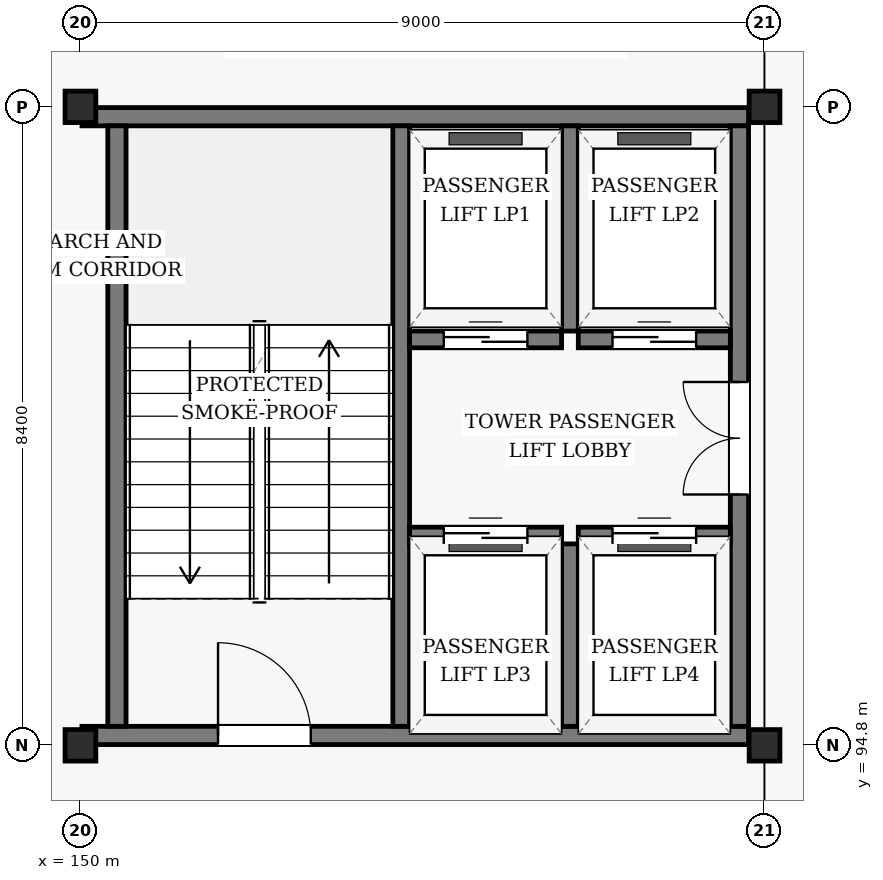
"""IFC4 building model, lengths in metres.
Left out: names, types, materials, properties, quantities, classifications, styles, units other than length and angle.
Written with IfcOpenShell. Run it as: python <this file> out.ifc"""

import sys

from ifc_helpers import new_model, si_unit, direction, frame, frame_2d, origin, origin_2d, place, context, subcontext, project, spatial, rectangle, i_section, extrude, element, fill, save


model = new_model("IFC4")
c1 = context("Model", 3, precision=1e-05, world=origin(), true_north=direction((0.0, 1.0)))
c2 = subcontext(c1, "Body", "Model", "MODEL_VIEW")
j1 = project(units=[si_unit("LENGTHUNIT", "METRE"), si_unit("PLANEANGLEUNIT", "RADIAN")], contexts=[c1])
p1 = place(None, origin())
s1 = spatial("IfcSite", under=j1, at=p1, CompositionType="ELEMENT")
p2 = place(p1, origin())
s2 = spatial("IfcBuilding", under=s1, at=p2, CompositionType="ELEMENT")
p3 = place(p2, frame((0.0, 0.0, 13.2)))
s3 = spatial("IfcBuildingStorey", under=s2, at=p3, CompositionType="ELEMENT", Elevation=13.2)
for number, where, z_axis, x_axis in (
    (1, (150.0, 94.8, 0.0), (0.0, 0.0, 1.0), (1.0, 0.0, 0.0)),
    (2, (150.0, 103.2, 0.0), (0.0, 0.0, 1.0), (1.0, 0.0, 0.0)),
    (3, (159.0, 94.8, 0.0), (0.0, 0.0, 1.0), (1.0, 0.0, 0.0)),
    (4, (159.0, 103.2, 0.0), (0.0, 0.0, 1.0), (1.0, 0.0, 0.0)),
):
    element("IfcColumn", number, at=place(p3, frame(where, z_axis=z_axis, x_axis=x_axis)), inside=s3, PredefinedType="COLUMN", context=c2, shape_type="SweptSolid", body=[
        extrude(i_section(OverallWidth=0.405, OverallDepth=0.414, WebThickness=0.018, FlangeThickness=0.028, FilletRadius=0.022, at=origin_2d()), origin(), (0.0, 0.0, 1.0), 3.9),
    ])
p4 = place(p3, frame((150.02, 94.93, 0.0), z_axis=(0.0, 0.0, 1.0), x_axis=(1.0, 0.0, 0.0)))
e5 = element("IfcWall", 5, at=p4, inside=s3, PredefinedType="SHEAR", context=c2, shape_type="SweptSolid", body=[
    extrude(rectangle(XDim=8.77, YDim=0.24, at=frame_2d((4.385, 0.0))), origin(), (0.0, 0.0, 1.0), 3.62),
])
p5 = place(p4, frame((1.79, 0.0, 0.0)))
e6 = element("IfcOpeningElement", 6, at=p5, cuts=e5, PredefinedType="OPENING", context=c2, shape_type="SweptSolid", body=[
    extrude(rectangle(XDim=1.22, YDim=2.18, at=frame_2d((0.61, 1.09))), frame((0.0, 0.13, 0.0), z_axis=(0.0, -1.0, 0.0), x_axis=(1.0, 0.0, 0.0)), (0.0, 0.0, 1.0), 0.26),
])
p6 = place(p3, frame((150.02, 103.07, 0.0), z_axis=(0.0, 0.0, 1.0), x_axis=(1.0, 0.0, 0.0)))
e7 = element("IfcWall", 7, at=p6, inside=s3, PredefinedType="SHEAR", context=c2, shape_type="SweptSolid", body=[
    extrude(rectangle(XDim=8.77, YDim=0.24, at=frame_2d((4.385, 0.0))), origin(), (0.0, 0.0, 1.0), 3.62),
])
p7 = place(p3, frame((150.48, 95.05, 0.0), z_axis=(0.0, 0.0, 1.0), x_axis=(0.0, 1.0, 0.0)))
e8 = element("IfcWall", 8, at=p7, inside=s3, PredefinedType="SHEAR", context=c2, shape_type="SweptSolid", body=[
    extrude(rectangle(XDim=7.9, YDim=0.24, at=frame_2d((3.95, 0.0))), origin(), (0.0, 0.0, 1.0), 3.62),
])
p8 = place(p3, frame((154.22, 95.05, 0.0), z_axis=(0.0, 0.0, 1.0), x_axis=(0.0, 1.0, 0.0)))
e9 = element("IfcWall", 9, at=p8, inside=s3, PredefinedType="SHEAR", context=c2, shape_type="SweptSolid", body=[
    extrude(rectangle(XDim=7.9, YDim=0.22, at=frame_2d((3.95, 0.0))), origin(), (0.0, 0.0, 1.0), 3.62),
])
p9 = place(p3, frame((158.67, 95.05, 0.0), z_axis=(0.0, 0.0, 1.0), x_axis=(0.0, 1.0, 0.0)))
e10 = element("IfcWall", 10, at=p9, inside=s3, PredefinedType="SHEAR", context=c2, shape_type="SweptSolid", body=[
    extrude(rectangle(XDim=7.9, YDim=0.24, at=frame_2d((3.95, 0.0))), origin(), (0.0, 0.0, 1.0), 3.62),
])
p10 = place(p9, frame((3.05, 0.0, 0.0)))
e11 = element("IfcOpeningElement", 11, at=p10, cuts=e10, PredefinedType="OPENING", context=c2, shape_type="SweptSolid", body=[
    extrude(rectangle(XDim=1.48, YDim=2.22, at=frame_2d((0.74, 1.11))), frame((0.0, 0.13, 0.0), z_axis=(0.0, -1.0, 0.0), x_axis=(1.0, 0.0, 0.0)), (0.0, 0.0, 1.0), 0.26),
])
p11 = place(p3, frame((156.44, 100.25, 0.0), z_axis=(0.0, 0.0, 1.0), x_axis=(0.0, 1.0, 0.0)))
e12 = element("IfcWall", 12, at=p11, inside=s3, PredefinedType="SHEAR", context=c2, shape_type="SweptSolid", body=[
    extrude(rectangle(XDim=2.7, YDim=0.22, at=frame_2d((1.35, 0.0))), origin(), (0.0, 0.0, 1.0), 3.62),
])
p12 = place(p3, frame((154.33, 100.14, 0.0), z_axis=(0.0, 0.0, 1.0), x_axis=(1.0, 0.0, 0.0)))
e13 = element("IfcWall", 13, at=p12, inside=s3, PredefinedType="SHEAR", context=c2, shape_type="SweptSolid", body=[
    extrude(rectangle(XDim=2.0, YDim=0.22, at=frame_2d((1.0, 0.0))), origin(), (0.0, 0.0, 1.0), 3.62),
])
p13 = place(p12, frame((0.45, 0.0, 0.0)))
e14 = element("IfcOpeningElement", 14, at=p13, cuts=e13, PredefinedType="OPENING", context=c2, shape_type="SweptSolid", body=[
    extrude(rectangle(XDim=1.1, YDim=2.15, at=frame_2d((0.55, 1.075))), frame((0.0, 0.12, 0.0), z_axis=(0.0, -1.0, 0.0), x_axis=(1.0, 0.0, 0.0)), (0.0, 0.0, 1.0), 0.24),
])
p14 = place(p3, frame((156.55, 100.14, 0.0), z_axis=(0.0, 0.0, 1.0), x_axis=(1.0, 0.0, 0.0)))
e15 = element("IfcWall", 15, at=p14, inside=s3, PredefinedType="SHEAR", context=c2, shape_type="SweptSolid", body=[
    extrude(rectangle(XDim=2.0, YDim=0.22, at=frame_2d((1.0, 0.0))), origin(), (0.0, 0.0, 1.0), 3.62),
])
p15 = place(p14, frame((0.45, 0.0, 0.0)))
e16 = element("IfcOpeningElement", 16, at=p15, cuts=e15, PredefinedType="OPENING", context=c2, shape_type="SweptSolid", body=[
    extrude(rectangle(XDim=1.1, YDim=2.15, at=frame_2d((0.55, 1.075))), frame((0.0, 0.12, 0.0), z_axis=(0.0, -1.0, 0.0), x_axis=(1.0, 0.0, 0.0)), (0.0, 0.0, 1.0), 0.24),
])
p16 = place(p3, frame((156.44, 95.05, 0.0), z_axis=(0.0, 0.0, 1.0), x_axis=(0.0, 1.0, 0.0)))
e17 = element("IfcWall", 17, at=p16, inside=s3, PredefinedType="SHEAR", context=c2, shape_type="SweptSolid", body=[
    extrude(rectangle(XDim=2.4, YDim=0.22, at=frame_2d((1.2, 0.0))), origin(), (0.0, 0.0, 1.0), 3.62),
])
p17 = place(p3, frame((154.33, 97.56, 0.0), z_axis=(0.0, 0.0, 1.0), x_axis=(1.0, 0.0, 0.0)))
e18 = element("IfcWall", 18, at=p17, inside=s3, PredefinedType="SHEAR", context=c2, shape_type="SweptSolid", body=[
    extrude(rectangle(XDim=2.0, YDim=0.22, at=frame_2d((1.0, 0.0))), origin(), (0.0, 0.0, 1.0), 3.62),
])
p18 = place(p17, frame((0.45, 0.0, 0.0)))
e19 = element("IfcOpeningElement", 19, at=p18, cuts=e18, PredefinedType="OPENING", context=c2, shape_type="SweptSolid", body=[
    extrude(rectangle(XDim=1.1, YDim=2.15, at=frame_2d((0.55, 1.075))), frame((0.0, 0.12, 0.0), z_axis=(0.0, -1.0, 0.0), x_axis=(1.0, 0.0, 0.0)), (0.0, 0.0, 1.0), 0.24),
])
p19 = place(p3, frame((156.55, 97.56, 0.0), z_axis=(0.0, 0.0, 1.0), x_axis=(1.0, 0.0, 0.0)))
e20 = element("IfcWall", 20, at=p19, inside=s3, PredefinedType="SHEAR", context=c2, shape_type="SweptSolid", body=[
    extrude(rectangle(XDim=2.0, YDim=0.22, at=frame_2d((1.0, 0.0))), origin(), (0.0, 0.0, 1.0), 3.62),
])
p20 = place(p19, frame((0.45, 0.0, 0.0)))
e21 = element("IfcOpeningElement", 21, at=p20, cuts=e20, PredefinedType="OPENING", context=c2, shape_type="SweptSolid", body=[
    extrude(rectangle(XDim=1.1, YDim=2.15, at=frame_2d((0.55, 1.075))), frame((0.0, 0.12, 0.0), z_axis=(0.0, -1.0, 0.0), x_axis=(1.0, 0.0, 0.0)), (0.0, 0.0, 1.0), 0.24),
])
p21 = place(p5, origin())
e22 = element("IfcDoor", 22, at=p21, inside=s3, OperationType="SINGLE_SWING_LEFT", PredefinedType="DOOR", context=c2, shape_type="SweptSolid", body=[
    extrude(rectangle(XDim=1.22, YDim=2.18, at=frame_2d((0.61, 1.09))), frame((0.0, 0.025, 0.0), z_axis=(0.0, -1.0, 0.0), x_axis=(1.0, 0.0, 0.0)), (0.0, 0.0, 1.0), 0.05),
])
fill(e6, e22)
p22 = place(p10, origin())
e23 = element("IfcDoor", 23, at=p22, inside=s3, OperationType="DOUBLE_DOOR_SINGLE_SWING", PredefinedType="DOOR", context=c2, shape_type="SweptSolid", body=[
    extrude(rectangle(XDim=1.48, YDim=2.22, at=frame_2d((0.74, 1.11))), frame((0.0, 0.025, 0.0), z_axis=(0.0, -1.0, 0.0), x_axis=(1.0, 0.0, 0.0)), (0.0, 0.0, 1.0), 0.05),
])
fill(e11, e23)
p23 = place(p13, origin())
e24 = element("IfcDoor", 24, at=p23, inside=s3, OperationType="SLIDING_TO_LEFT", PredefinedType="DOOR", context=c2, shape_type="SweptSolid", body=[
    extrude(rectangle(XDim=1.1, YDim=2.15, at=frame_2d((0.55, 1.075))), frame((0.0, 0.025, 0.0), z_axis=(0.0, -1.0, 0.0), x_axis=(1.0, 0.0, 0.0)), (0.0, 0.0, 1.0), 0.05),
])
fill(e14, e24)
p24 = place(p15, origin())
e25 = element("IfcDoor", 25, at=p24, inside=s3, OperationType="SLIDING_TO_LEFT", PredefinedType="DOOR", context=c2, shape_type="SweptSolid", body=[
    extrude(rectangle(XDim=1.1, YDim=2.15, at=frame_2d((0.55, 1.075))), frame((0.0, 0.025, 0.0), z_axis=(0.0, -1.0, 0.0), x_axis=(1.0, 0.0, 0.0)), (0.0, 0.0, 1.0), 0.05),
])
fill(e16, e25)
p25 = place(p18, origin())
e26 = element("IfcDoor", 26, at=p25, inside=s3, OperationType="SLIDING_TO_LEFT", PredefinedType="DOOR", context=c2, shape_type="SweptSolid", body=[
    extrude(rectangle(XDim=1.1, YDim=2.15, at=frame_2d((0.55, 1.075))), frame((0.0, 0.025, 0.0), z_axis=(0.0, -1.0, 0.0), x_axis=(1.0, 0.0, 0.0)), (0.0, 0.0, 1.0), 0.05),
])
fill(e19, e26)
p26 = place(p20, origin())
e27 = element("IfcDoor", 27, at=p26, inside=s3, OperationType="SLIDING_TO_LEFT", PredefinedType="DOOR", context=c2, shape_type="SweptSolid", body=[
    extrude(rectangle(XDim=1.1, YDim=2.15, at=frame_2d((0.55, 1.075))), frame((0.0, 0.025, 0.0), z_axis=(0.0, -1.0, 0.0), x_axis=(1.0, 0.0, 0.0)), (0.0, 0.0, 1.0), 0.05),
])
fill(e21, e27)
save(model, sys.argv[1])
